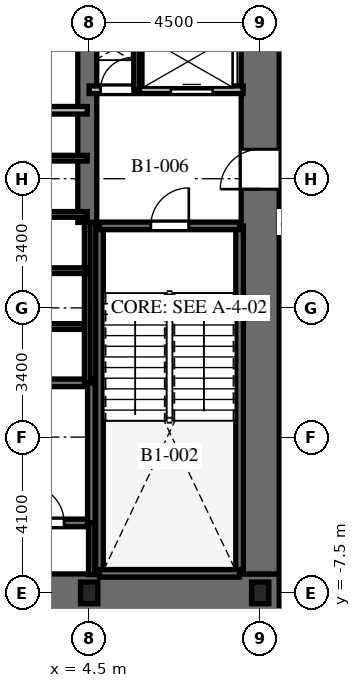
"""IFC4 building model, lengths in metres.
Left out: names, types, materials, properties, quantities, classifications, styles, units other than length and angle.
Written with IfcOpenShell. Run it as: python <this file> out.ifc"""

import sys

from ifc_helpers import new_model, si_unit, direction, frame, frame_2d, origin, origin_2d, place, context, subcontext, project, spatial, rectangle, i_section, extrude, element, fill, save


model = new_model("IFC4")
c1 = context("Model", 3, precision=1e-05, world=origin(), true_north=direction((0.0, 1.0)))
c2 = subcontext(c1, "Body", "Model", "MODEL_VIEW")
j1 = project(units=[si_unit("LENGTHUNIT", "METRE"), si_unit("PLANEANGLEUNIT", "RADIAN")], contexts=[c1])
p1 = place(None, origin())
s1 = spatial("IfcSite", under=j1, at=p1, CompositionType="ELEMENT")
p2 = place(p1, origin())
s2 = spatial("IfcBuilding", under=s1, at=p2, CompositionType="ELEMENT")
p3 = place(p2, frame((0.0, 0.0, -4.5)))
s3 = spatial("IfcBuildingStorey", under=s2, at=p3, CompositionType="ELEMENT", Elevation=-4.5)
p4 = place(p3, frame((-9.5, -7.5, 0.0), z_axis=(0.0, 0.0, 1.0), x_axis=(1.0, 0.0, 0.0)))
e1 = element("IfcWall", 1, at=p4, inside=s3, PredefinedType="SHEAR", context=c2, shape_type="SweptSolid", body=[
    extrude(rectangle(XDim=19.0, YDim=1.0, at=frame_2d((9.5, 0.0))), origin(), (0.0, 0.0, 1.0), 4.5),
])
p5 = place(p4, frame((9.55, 0.0, 0.0)))
e2 = element("IfcOpeningElement", 2, at=p5, cuts=e1, PredefinedType="OPENING", context=c2, shape_type="SweptSolid", body=[
    extrude(rectangle(XDim=1.0, YDim=2.15, at=frame_2d((0.5, 1.075))), frame((0.0, 0.51, 0.0), z_axis=(0.0, -1.0, 0.0), x_axis=(1.0, 0.0, 0.0)), (0.0, 0.0, 1.0), 1.02),
])
p6 = place(p3, frame((9.0, -7.0, 0.0), z_axis=(0.0, 0.0, 1.0), x_axis=(0.0, 1.0, 0.0)))
e3 = element("IfcWall", 3, at=p6, inside=s3, PredefinedType="SHEAR", context=c2, shape_type="SweptSolid", body=[
    extrude(rectangle(XDim=14.0, YDim=1.0, at=frame_2d((7.0, 0.0))), origin(), (0.0, 0.0, 1.0), 4.5),
])
p7 = place(p6, frame((10.125, 0.0, 0.0)))
e4 = element("IfcOpeningElement", 4, at=p7, cuts=e3, PredefinedType="OPENING", context=c2, shape_type="SweptSolid", body=[
    extrude(rectangle(XDim=1.05, YDim=2.15, at=frame_2d((0.525, 1.075))), frame((0.0, 0.51, 0.0), z_axis=(0.0, -1.0, 0.0), x_axis=(1.0, 0.0, 0.0)), (0.0, 0.0, 1.0), 1.02),
])
p8 = place(p3, frame((4.45, 2.25, 0.0), z_axis=(0.0, 0.0, 1.0), x_axis=(0.0, 1.0, 0.0)))
e5 = element("IfcWall", 5, at=p8, inside=s3, PredefinedType="SHEAR", context=c2, shape_type="SweptSolid", body=[
    extrude(rectangle(XDim=4.75, YDim=0.5, at=frame_2d((2.375, 0.0))), origin(), (0.0, 0.0, 1.0), 4.5),
])
for number, where, z_axis, x_axis in (
    (6, (4.772, -6.985, 0.0), (0.0, 0.0, 1.0), (0.0, 1.0, 0.0)),
    (7, (8.458, -6.985, 0.0), (0.0, 0.0, 1.0), (0.0, 1.0, 0.0)),
):
    element("IfcWall", number, at=place(p3, frame(where, z_axis=z_axis, x_axis=x_axis)), inside=s3, PredefinedType="SHEAR", context=c2, shape_type="SweptSolid", body=[
        extrude(rectangle(XDim=9.143, YDim=0.2, at=frame_2d((4.572, 0.0))), origin(), (0.0, 0.0, 1.0), 4.5),
    ])
p9 = place(p3, frame((4.772, -6.985, 0.0), z_axis=(0.0, 0.0, 1.0), x_axis=(1.0, 0.0, 0.0)))
e8 = element("IfcWall", 8, at=p9, inside=s3, PredefinedType="SHEAR", context=c2, shape_type="SweptSolid", body=[
    extrude(rectangle(XDim=3.686, YDim=0.2, at=frame_2d((1.843, 0.0))), origin(), (0.0, 0.0, 1.0), 4.5),
])
p10 = place(p3, frame((4.772, 2.158, 0.0), z_axis=(0.0, 0.0, 1.0), x_axis=(1.0, 0.0, 0.0)))
e9 = element("IfcWall", 9, at=p10, inside=s3, PredefinedType="SHEAR", context=c2, shape_type="SweptSolid", body=[
    extrude(rectangle(XDim=3.686, YDim=0.2, at=frame_2d((1.843, 0.0))), origin(), (0.0, 0.0, 1.0), 4.5),
])
p11 = place(p10, frame((1.35, 0.0, 0.0)))
e10 = element("IfcOpeningElement", 10, at=p11, cuts=e9, PredefinedType="OPENING", context=c2, shape_type="SweptSolid", body=[
    extrude(rectangle(XDim=1.0, YDim=2.15, at=frame_2d((0.5, 1.075))), frame((0.0, 0.11, 0.0), z_axis=(0.0, -1.0, 0.0), x_axis=(1.0, 0.0, 0.0)), (0.0, 0.0, 1.0), 0.22),
])
p12 = place(p3, frame((-4.608, -5.658, 0.0), z_axis=(0.0, 0.0, 1.0), x_axis=(1.0, 0.0, 0.0)))
e11 = element("IfcWall", 11, at=p12, inside=s3, PredefinedType="SHEAR", context=c2, shape_type="SweptSolid", body=[
    extrude(rectangle(XDim=9.166, YDim=0.2, at=frame_2d((4.583, 0.0))), origin(), (0.0, 0.0, 1.0), 4.5),
])
p13 = place(p12, frame((7.45, 0.0, 0.0)))
e12 = element("IfcOpeningElement", 12, at=p13, cuts=e11, PredefinedType="OPENING", context=c2, shape_type="SweptSolid", body=[
    extrude(rectangle(XDim=1.0, YDim=2.15, at=frame_2d((0.5, 1.075))), frame((0.0, 0.11, 0.0), z_axis=(0.0, -1.0, 0.0), x_axis=(1.0, 0.0, 0.0)), (0.0, 0.0, 1.0), 0.22),
])
p14 = place(p3, frame((-4.608, -1.972, 0.0), z_axis=(0.0, 0.0, 1.0), x_axis=(1.0, 0.0, 0.0)))
e13 = element("IfcWall", 13, at=p14, inside=s3, PredefinedType="SHEAR", context=c2, shape_type="SweptSolid", body=[
    extrude(rectangle(XDim=9.166, YDim=0.2, at=frame_2d((4.583, 0.0))), origin(), (0.0, 0.0, 1.0), 4.5),
])
p15 = place(p3, frame((4.558, -5.658, 0.0), z_axis=(0.0, 0.0, 1.0), x_axis=(0.0, 1.0, 0.0)))
e14 = element("IfcWall", 14, at=p15, inside=s3, PredefinedType="SHEAR", context=c2, shape_type="SweptSolid", body=[
    extrude(rectangle(XDim=3.686, YDim=0.2, at=frame_2d((1.843, 0.0))), origin(), (0.0, 0.0, 1.0), 4.5),
])
for number, where, z_axis, x_axis in (
    (15, (4.5, -7.5, 0.0), (0.0, 0.0, 1.0), (1.0, 0.0, 0.0)),
    (16, (9.0, -7.5, 0.0), (0.0, 0.0, 1.0), (1.0, 0.0, 0.0)),
):
    element("IfcColumn", number, at=place(p3, frame(where, z_axis=z_axis, x_axis=x_axis)), inside=s3, PredefinedType="COLUMN", context=c2, shape_type="SweptSolid", body=[
        extrude(i_section(OverallWidth=0.454, OverallDepth=0.569, WebThickness=0.078, FlangeThickness=0.125, at=origin_2d()), origin(), (0.0, 0.0, 1.0), 4.5),
    ])
p16 = place(p3, frame((4.558, -7.02, 0.0), z_axis=(0.0, 0.0, 1.0), x_axis=(0.0, 1.0, 0.0)))
e17 = element("IfcWall", 17, at=p16, inside=s3, PredefinedType="PARTITIONING", context=c2, shape_type="SweptSolid", body=[
    extrude(rectangle(XDim=1.362, YDim=0.15, at=frame_2d((0.681, 0.0))), origin(), (0.0, 0.0, 1.0), 4.18),
])
p17 = place(p3, frame((4.5, 5.74, 0.0), z_axis=(0.0, 0.0, 1.0), x_axis=(1.0, 0.0, 0.0)))
e18 = element("IfcWall", 18, at=p17, inside=s3, PredefinedType="PARTITIONING", context=c2, shape_type="SweptSolid", body=[
    extrude(rectangle(XDim=4.05, YDim=0.2, at=frame_2d((2.025, 0.0))), origin(), (0.0, 0.0, 1.0), 4.18),
])
p18 = place(p17, frame((0.3, 0.0, 0.0)))
e19 = element("IfcOpeningElement", 19, at=p18, cuts=e18, PredefinedType="OPENING", context=c2, shape_type="SweptSolid", body=[
    extrude(rectangle(XDim=0.85, YDim=2.03, at=frame_2d((0.425, 1.015))), frame((0.0, 0.11, 0.0), z_axis=(0.0, -1.0, 0.0), x_axis=(1.0, 0.0, 0.0)), (0.0, 0.0, 1.0), 0.22),
])
p19 = place(p17, frame((2.15, 0.0, 0.0)))
e20 = element("IfcOpeningElement", 20, at=p19, cuts=e18, PredefinedType="OPENING", context=c2, shape_type="SweptSolid", body=[
    extrude(rectangle(XDim=1.1, YDim=2.2, at=frame_2d((0.55, 1.1))), frame((0.0, 0.11, 0.0), z_axis=(0.0, -1.0, 0.0), x_axis=(1.0, 0.0, 0.0)), (0.0, 0.0, 1.0), 0.22),
])
p20 = place(p3, frame((5.75, 5.74, 0.0), z_axis=(0.0, 0.0, 1.0), x_axis=(0.0, 1.0, 0.0)))
e21 = element("IfcWall", 21, at=p20, inside=s3, PredefinedType="PARTITIONING", context=c2, shape_type="SweptSolid", body=[
    extrude(rectangle(XDim=1.41, YDim=0.15, at=frame_2d((0.705, 0.0))), origin(), (0.0, 0.0, 1.0), 4.18),
])
p21 = place(p3, frame((1.85, 5.2, 0.0), z_axis=(0.0, 0.0, 1.0), x_axis=(1.0, 0.0, 0.0)))
e22 = element("IfcWall", 22, at=p21, inside=s3, PredefinedType="PARTITIONING", context=c2, shape_type="SweptSolid", body=[
    extrude(rectangle(XDim=2.6, YDim=0.2, at=frame_2d((1.3, 0.0))), origin(), (0.0, 0.0, 1.0), 4.18),
])
p22 = place(p3, frame((4.45, -1.972, 0.0), z_axis=(0.0, 0.0, 1.0), x_axis=(0.0, 1.0, 0.0)))
e23 = element("IfcWall", 23, at=p22, inside=s3, PredefinedType="PARTITIONING", context=c2, shape_type="SweptSolid", body=[
    extrude(rectangle(XDim=4.222, YDim=0.15, at=frame_2d((2.111, 0.0))), origin(), (0.0, 0.0, 1.0), 4.18),
])
for number, where, z_axis, x_axis in (
    (24, (1.9, 3.94, 0.0), (0.0, 0.0, 1.0), (1.0, 0.0, 0.0)),
    (25, (1.9, 0.98, 0.0), (0.0, 0.0, 1.0), (1.0, 0.0, 0.0)),
    (26, (1.9, 2.46, 0.0), (0.0, 0.0, 1.0), (1.0, 0.0, 0.0)),
):
    element("IfcWall", number, at=place(p3, frame(where, z_axis=z_axis, x_axis=x_axis)), inside=s3, PredefinedType="PARTITIONING", context=c2, shape_type="SweptSolid", body=[
        extrude(rectangle(XDim=2.55, YDim=0.15, at=frame_2d((1.275, 0.0))), origin(), (0.0, 0.0, 1.0), 4.18),
    ])
p23 = place(p3, frame((-4.36, -0.49, 0.0), z_axis=(0.0, 0.0, 1.0), x_axis=(1.0, 0.0, 0.0)))
e27 = element("IfcWall", 27, at=p23, inside=s3, PredefinedType="PARTITIONING", context=c2, shape_type="SweptSolid", body=[
    extrude(rectangle(XDim=8.72, YDim=0.15, at=frame_2d((4.36, 0.0))), origin(), (0.0, 0.0, 1.0), 4.18),
])
p24 = place(p23, frame((3.86, 0.0, 0.0)))
e28 = element("IfcOpeningElement", 28, at=p24, cuts=e27, PredefinedType="OPENING", context=c2, shape_type="SweptSolid", body=[
    extrude(rectangle(XDim=0.9, YDim=2.03, at=frame_2d((0.45, 1.015))), frame((0.0, 0.085, 0.0), z_axis=(0.0, -1.0, 0.0), x_axis=(1.0, 0.0, 0.0)), (0.0, 0.0, 1.0), 0.17),
])
p25 = place(p11, origin())
e29 = element("IfcDoor", 29, at=p25, inside=s3, OperationType="SINGLE_SWING_RIGHT", PredefinedType="DOOR", context=c2, shape_type="SweptSolid", body=[
    extrude(rectangle(XDim=1.0, YDim=2.15, at=frame_2d((0.5, 1.075))), frame((0.0, 0.025, 0.0), z_axis=(0.0, -1.0, 0.0), x_axis=(1.0, 0.0, 0.0)), (0.0, 0.0, 1.0), 0.05),
])
fill(e10, e29)
p26 = place(p13, origin())
e30 = element("IfcDoor", 30, at=p26, inside=s3, OperationType="SINGLE_SWING_LEFT", PredefinedType="DOOR", context=c2, shape_type="SweptSolid", body=[
    extrude(rectangle(XDim=1.0, YDim=2.15, at=frame_2d((0.5, 1.075))), frame((0.0, 0.025, 0.0), z_axis=(0.0, -1.0, 0.0), x_axis=(1.0, 0.0, 0.0)), (0.0, 0.0, 1.0), 0.05),
])
fill(e12, e30)
p27 = place(p7, origin())
e31 = element("IfcDoor", 31, at=p27, inside=s3, OperationType="SINGLE_SWING_LEFT", PredefinedType="DOOR", context=c2, shape_type="SweptSolid", body=[
    extrude(rectangle(XDim=1.05, YDim=2.15, at=frame_2d((0.525, 1.075))), frame((0.0, 0.025, 0.0), z_axis=(0.0, -1.0, 0.0), x_axis=(1.0, 0.0, 0.0)), (0.0, 0.0, 1.0), 0.05),
])
fill(e4, e31)
p28 = place(p18, origin())
e32 = element("IfcDoor", 32, at=p28, inside=s3, OperationType="SINGLE_SWING_RIGHT", PredefinedType="DOOR", context=c2, shape_type="SweptSolid", body=[
    extrude(rectangle(XDim=0.85, YDim=2.03, at=frame_2d((0.425, 1.015))), frame((0.0, 0.025, 0.0), z_axis=(0.0, -1.0, 0.0), x_axis=(1.0, 0.0, 0.0)), (0.0, 0.0, 1.0), 0.05),
])
fill(e19, e32)
p29 = place(p19, origin())
e33 = element("IfcDoor", 33, at=p29, inside=s3, OperationType="SLIDING_TO_RIGHT", PredefinedType="DOOR", context=c2, shape_type="SweptSolid", body=[
    extrude(rectangle(XDim=1.1, YDim=2.2, at=frame_2d((0.55, 1.1))), frame((0.0, 0.025, 0.0), z_axis=(0.0, -1.0, 0.0), x_axis=(1.0, 0.0, 0.0)), (0.0, 0.0, 1.0), 0.05),
])
fill(e20, e33)
save(model, sys.argv[1])
